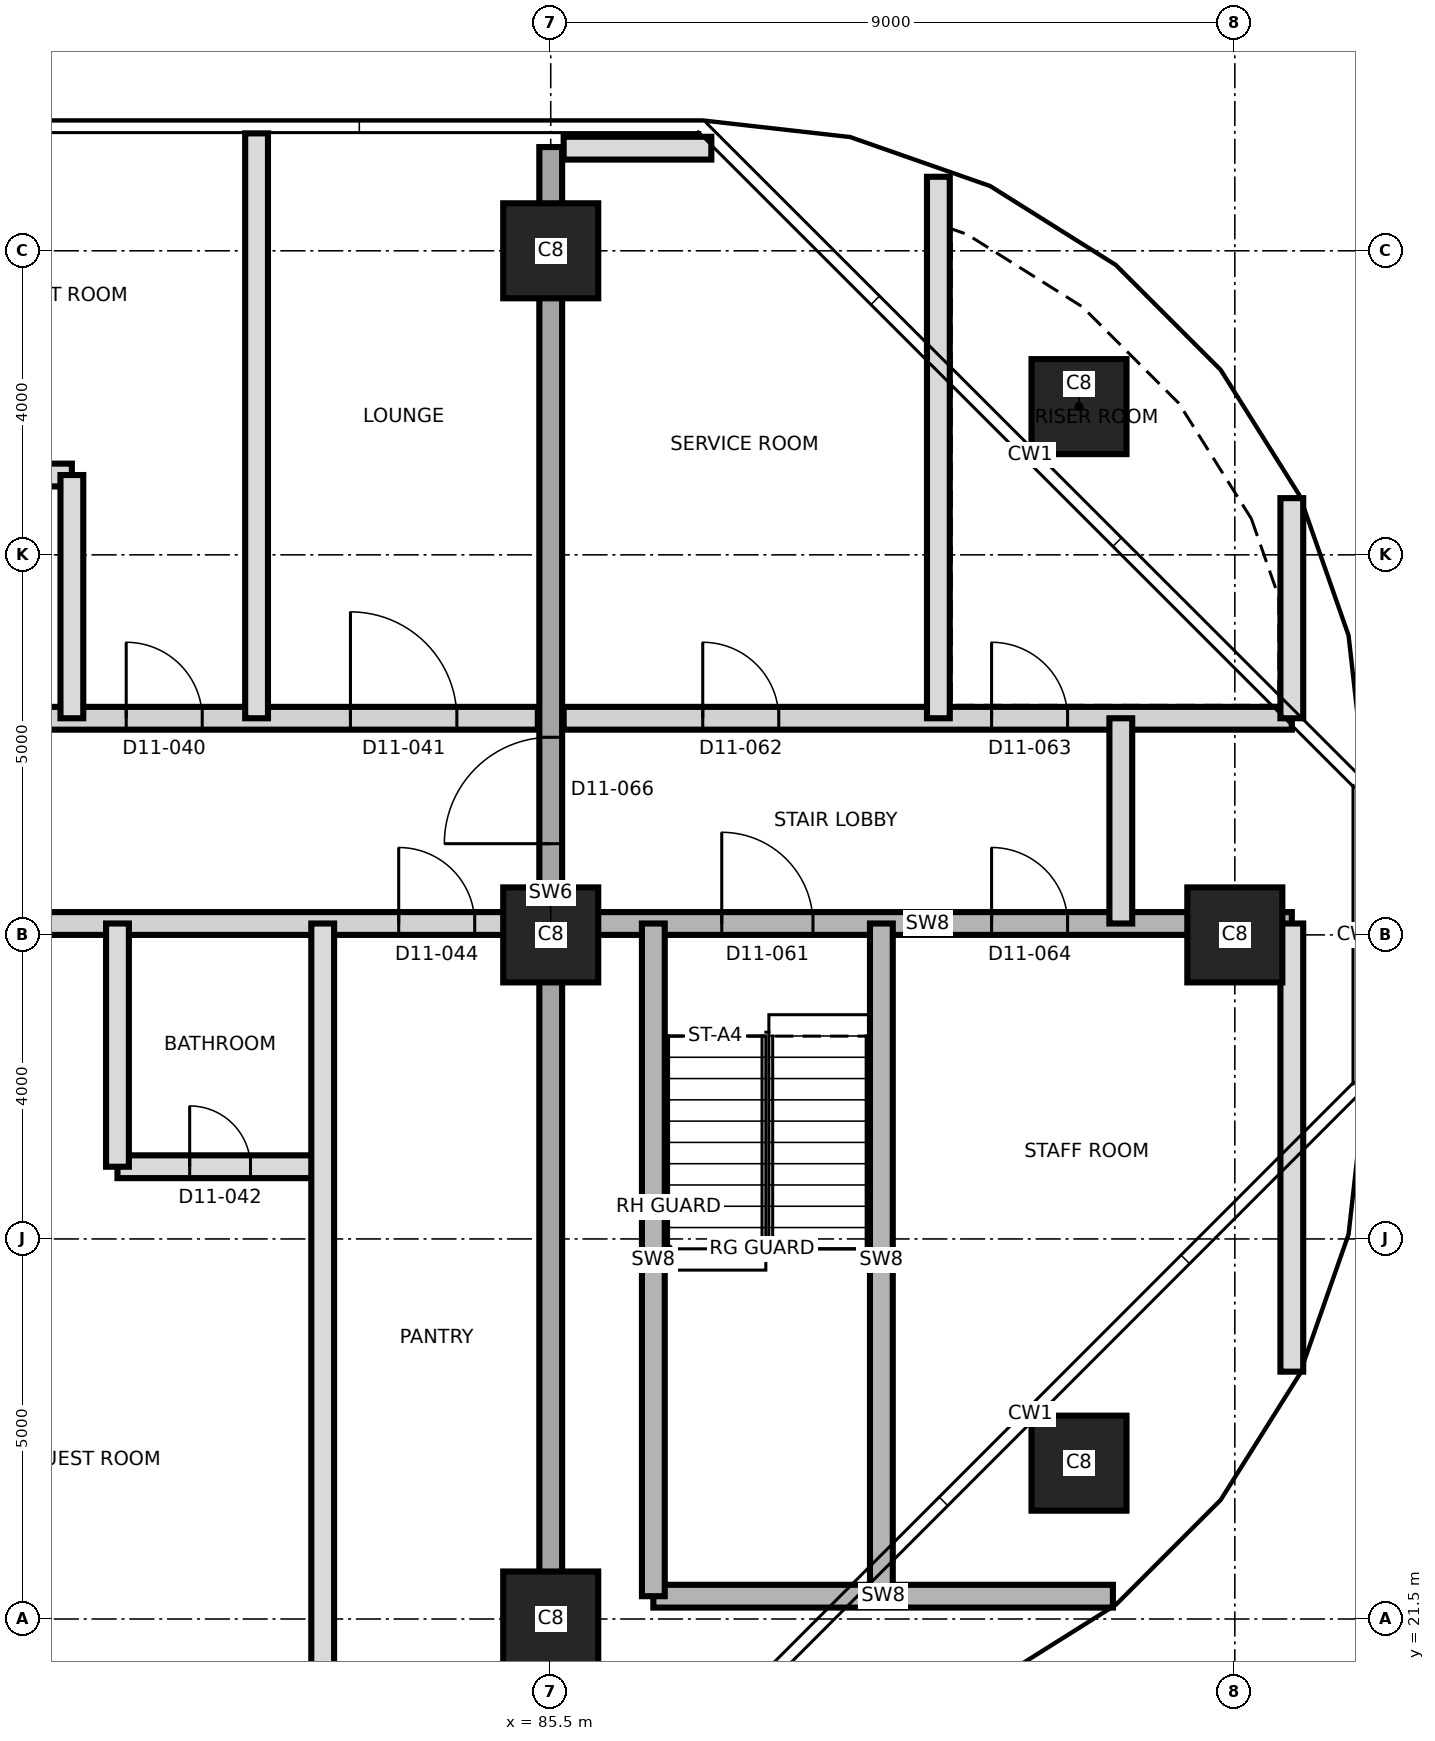
"""IFC4 building model, lengths in metres.
Left out: names, types, materials, properties, quantities, classifications, styles, units other than length and angle.
Written with IfcOpenShell. Run it as: python <this file> out.ifc"""

import sys

from ifc_helpers import new_model, si_unit, direction, frame, frame_2d, origin, origin_2d, place, context, subcontext, project, spatial, rectangle, extrude, element, fill, save


model = new_model("IFC4")
c1 = context("Model", 3, precision=1e-05, world=origin(), true_north=direction((0.0, 1.0)))
c2 = subcontext(c1, "Body", "Model", "MODEL_VIEW")
j1 = project(units=[si_unit("LENGTHUNIT", "METRE"), si_unit("PLANEANGLEUNIT", "RADIAN")], contexts=[c1])
p1 = place(None, origin())
s1 = spatial("IfcSite", under=j1, at=p1, CompositionType="ELEMENT")
p2 = place(p1, origin())
s2 = spatial("IfcBuilding", under=s1, at=p2, CompositionType="ELEMENT")
p3 = place(p2, frame((0.0, 0.0, 124.1)))
s3 = spatial("IfcBuildingStorey", under=s2, at=p3, CompositionType="ELEMENT", Elevation=124.1)
for number, where, z_axis, x_axis in (
    (1, (85.5, 21.5, 0.0), (0.0, 0.0, 1.0), (1.0, 0.0, 0.0)),
    (2, (92.45, 23.55, 0.0), (0.0, 0.0, 1.0), (1.0, 0.0, 0.0)),
    (3, (85.5, 30.5, 0.0), (0.0, 0.0, 1.0), (1.0, 0.0, 0.0)),
    (4, (94.5, 30.5, 0.0), (0.0, 0.0, 1.0), (1.0, 0.0, 0.0)),
    (5, (92.45, 37.45, 0.0), (0.0, 0.0, 1.0), (1.0, 0.0, 0.0)),
    (6, (85.5, 39.5, 0.0), (0.0, 0.0, 1.0), (1.0, 0.0, 0.0)),
):
    element("IfcColumn", number, at=place(p3, frame(where, z_axis=z_axis, x_axis=x_axis)), inside=s3, PredefinedType="COLUMN", context=c2, shape_type="SweptSolid", body=[
        extrude(rectangle(XDim=1.25, YDim=1.25, at=origin_2d()), origin(), (0.0, 0.0, 1.0), 3.7),
    ])
p4 = place(p3, frame((85.5, 20.135, 0.0), z_axis=(0.0, 0.0, 1.0), x_axis=(0.0, 1.0, 0.0)))
e7 = element("IfcWall", 7, at=p4, inside=s3, PredefinedType="SHEAR", context=c2, shape_type="SweptSolid", body=[
    extrude(rectangle(XDim=20.73, YDim=0.3, at=frame_2d((10.365, 0.0))), origin(), (0.0, 0.0, 1.0), 3.7),
])
p5 = place(p4, frame((11.565, 0.0, 0.0)))
e8 = element("IfcOpeningElement", 8, at=p5, cuts=e7, PredefinedType="OPENING", context=c2, shape_type="SweptSolid", body=[
    extrude(rectangle(XDim=1.4, YDim=2.1, at=frame_2d((0.7, 1.05))), frame((0.0, 0.16, 0.0), z_axis=(0.0, -1.0, 0.0), x_axis=(1.0, 0.0, 0.0)), (0.0, 0.0, 1.0), 0.32),
])
p6 = place(p3, frame((86.85, 21.8, 0.0), z_axis=(0.0, 0.0, 1.0), x_axis=(1.0, 0.0, 0.0)))
e9 = element("IfcWall", 9, at=p6, inside=s3, PredefinedType="SHEAR", context=c2, shape_type="SweptSolid", body=[
    extrude(rectangle(XDim=6.046, YDim=0.3, at=frame_2d((3.023, 0.0))), origin(), (0.0, 0.0, 1.0), 3.4),
])
p7 = place(p3, frame((79.8, 27.45, 0.0), z_axis=(0.0, 0.0, 1.0), x_axis=(1.0, 0.0, 0.0)))
e10 = element("IfcWall", 10, at=p7, inside=s3, PredefinedType="PARTITIONING", context=c2, shape_type="SweptSolid", body=[
    extrude(rectangle(XDim=2.7, YDim=0.3, at=frame_2d((1.35, 0.0))), origin(), (0.0, 0.0, 1.0), 3.4),
])
p8 = place(p7, frame((0.95, 0.0, 0.0)))
e11 = element("IfcOpeningElement", 11, at=p8, cuts=e10, PredefinedType="OPENING", context=c2, shape_type="SweptSolid", body=[
    extrude(rectangle(XDim=0.8, YDim=2.1, at=frame_2d((0.4, 1.05))), frame((0.0, 0.16, 0.0), z_axis=(0.0, -1.0, 0.0), x_axis=(1.0, 0.0, 0.0)), (0.0, 0.0, 1.0), 0.32),
])
p9 = place(p3, frame((58.8, 30.65, 0.0), z_axis=(0.0, 0.0, 1.0), x_axis=(1.0, 0.0, 0.0)))
e12 = element("IfcWall", 12, at=p9, inside=s3, PredefinedType="PARTITIONING", context=c2, shape_type="SweptSolid", body=[
    extrude(rectangle(XDim=26.53, YDim=0.3, at=frame_2d((13.265, 0.0))), origin(), (0.0, 0.0, 1.0), 3.4),
])
p10 = place(p9, frame((3.115, 0.0, 0.0)))
e13 = element("IfcOpeningElement", 13, at=p10, cuts=e12, PredefinedType="OPENING", context=c2, shape_type="SweptSolid", body=[
    extrude(rectangle(XDim=1.0, YDim=2.1, at=frame_2d((0.5, 1.05))), frame((0.0, 0.16, 0.0), z_axis=(0.0, -1.0, 0.0), x_axis=(1.0, 0.0, 0.0)), (0.0, 0.0, 1.0), 0.32),
])
p11 = place(p9, frame((6.065, 0.0, 0.0)))
e14 = element("IfcOpeningElement", 14, at=p11, cuts=e12, PredefinedType="OPENING", context=c2, shape_type="SweptSolid", body=[
    extrude(rectangle(XDim=1.4, YDim=2.1, at=frame_2d((0.7, 1.05))), frame((0.0, 0.16, 0.0), z_axis=(0.0, -1.0, 0.0), x_axis=(1.0, 0.0, 0.0)), (0.0, 0.0, 1.0), 0.32),
])
p12 = place(p9, frame((12.7, 0.0, 0.0)))
e15 = element("IfcOpeningElement", 15, at=p12, cuts=e12, PredefinedType="OPENING", context=c2, shape_type="SweptSolid", body=[
    extrude(rectangle(XDim=1.0, YDim=2.4, at=frame_2d((0.5, 1.2))), frame((0.0, 0.16, 0.0), z_axis=(0.0, -1.0, 0.0), x_axis=(1.0, 0.0, 0.0)), (0.0, 0.0, 1.0), 0.32),
])
p13 = place(p9, frame((18.85, 0.0, 0.0)))
e16 = element("IfcOpeningElement", 16, at=p13, cuts=e12, PredefinedType="OPENING", context=c2, shape_type="SweptSolid", body=[
    extrude(rectangle(XDim=1.0, YDim=2.1, at=frame_2d((0.5, 1.05))), frame((0.0, 0.16, 0.0), z_axis=(0.0, -1.0, 0.0), x_axis=(1.0, 0.0, 0.0)), (0.0, 0.0, 1.0), 0.32),
])
p14 = place(p9, frame((24.7, 0.0, 0.0)))
e17 = element("IfcOpeningElement", 17, at=p14, cuts=e12, PredefinedType="OPENING", context=c2, shape_type="SweptSolid", body=[
    extrude(rectangle(XDim=1.0, YDim=2.1, at=frame_2d((0.5, 1.05))), frame((0.0, 0.16, 0.0), z_axis=(0.0, -1.0, 0.0), x_axis=(1.0, 0.0, 0.0)), (0.0, 0.0, 1.0), 0.32),
])
p15 = place(p3, frame((85.67, 30.65, 0.0), z_axis=(0.0, 0.0, 1.0), x_axis=(1.0, 0.0, 0.0)))
e18 = element("IfcWall", 18, at=p15, inside=s3, PredefinedType="SHEAR", context=c2, shape_type="SweptSolid", body=[
    extrude(rectangle(XDim=9.58, YDim=0.3, at=frame_2d((4.79, 0.0))), origin(), (0.0, 0.0, 1.0), 3.4),
])
p16 = place(p15, frame((2.08, 0.0, 0.0)))
e19 = element("IfcOpeningElement", 19, at=p16, cuts=e18, PredefinedType="OPENING", context=c2, shape_type="SweptSolid", body=[
    extrude(rectangle(XDim=1.2, YDim=2.1, at=frame_2d((0.6, 1.05))), frame((0.0, 0.16, 0.0), z_axis=(0.0, -1.0, 0.0), x_axis=(1.0, 0.0, 0.0)), (0.0, 0.0, 1.0), 0.32),
])
p17 = place(p15, frame((5.63, 0.0, 0.0)))
e20 = element("IfcOpeningElement", 20, at=p17, cuts=e18, PredefinedType="OPENING", context=c2, shape_type="SweptSolid", body=[
    extrude(rectangle(XDim=1.0, YDim=2.1, at=frame_2d((0.5, 1.05))), frame((0.0, 0.16, 0.0), z_axis=(0.0, -1.0, 0.0), x_axis=(1.0, 0.0, 0.0)), (0.0, 0.0, 1.0), 0.32),
])
p18 = place(p3, frame((58.8, 33.35, 0.0), z_axis=(0.0, 0.0, 1.0), x_axis=(1.0, 0.0, 0.0)))
e21 = element("IfcWall", 21, at=p18, inside=s3, PredefinedType="PARTITIONING", context=c2, shape_type="SweptSolid", body=[
    extrude(rectangle(XDim=26.53, YDim=0.3, at=frame_2d((13.265, 0.0))), origin(), (0.0, 0.0, 1.0), 3.4),
])
p19 = place(p18, frame((0.835, 0.0, 0.0)))
e22 = element("IfcOpeningElement", 22, at=p19, cuts=e21, PredefinedType="OPENING", context=c2, shape_type="SweptSolid", body=[
    extrude(rectangle(XDim=1.2, YDim=2.1, at=frame_2d((0.6, 1.05))), frame((0.0, 0.16, 0.0), z_axis=(0.0, -1.0, 0.0), x_axis=(1.0, 0.0, 0.0)), (0.0, 0.0, 1.0), 0.32),
])
p20 = place(p18, frame((4.085, 0.0, 0.0)))
e23 = element("IfcOpeningElement", 23, at=p20, cuts=e21, PredefinedType="OPENING", context=c2, shape_type="SweptSolid", body=[
    extrude(rectangle(XDim=1.0, YDim=2.1, at=frame_2d((0.5, 1.05))), frame((0.0, 0.16, 0.0), z_axis=(0.0, -1.0, 0.0), x_axis=(1.0, 0.0, 0.0)), (0.0, 0.0, 1.0), 0.32),
])
p21 = place(p18, frame((12.7, 0.0, 0.0)))
e24 = element("IfcOpeningElement", 24, at=p21, cuts=e21, PredefinedType="OPENING", context=c2, shape_type="SweptSolid", body=[
    extrude(rectangle(XDim=1.0, YDim=2.4, at=frame_2d((0.5, 1.2))), frame((0.0, 0.16, 0.0), z_axis=(0.0, -1.0, 0.0), x_axis=(1.0, 0.0, 0.0)), (0.0, 0.0, 1.0), 0.32),
])
p22 = place(p18, frame((21.115, 0.0, 0.0)))
e25 = element("IfcOpeningElement", 25, at=p22, cuts=e21, PredefinedType="OPENING", context=c2, shape_type="SweptSolid", body=[
    extrude(rectangle(XDim=1.0, YDim=2.1, at=frame_2d((0.5, 1.05))), frame((0.0, 0.16, 0.0), z_axis=(0.0, -1.0, 0.0), x_axis=(1.0, 0.0, 0.0)), (0.0, 0.0, 1.0), 0.32),
])
p23 = place(p18, frame((24.065, 0.0, 0.0)))
e26 = element("IfcOpeningElement", 26, at=p23, cuts=e21, PredefinedType="OPENING", context=c2, shape_type="SweptSolid", body=[
    extrude(rectangle(XDim=1.4, YDim=2.1, at=frame_2d((0.7, 1.05))), frame((0.0, 0.16, 0.0), z_axis=(0.0, -1.0, 0.0), x_axis=(1.0, 0.0, 0.0)), (0.0, 0.0, 1.0), 0.32),
])
p24 = place(p3, frame((85.67, 33.35, 0.0), z_axis=(0.0, 0.0, 1.0), x_axis=(1.0, 0.0, 0.0)))
e27 = element("IfcWall", 27, at=p24, inside=s3, PredefinedType="PARTITIONING", context=c2, shape_type="SweptSolid", body=[
    extrude(rectangle(XDim=9.58, YDim=0.3, at=frame_2d((4.79, 0.0))), origin(), (0.0, 0.0, 1.0), 3.4),
])
p25 = place(p24, frame((1.83, 0.0, 0.0)))
e28 = element("IfcOpeningElement", 28, at=p25, cuts=e27, PredefinedType="OPENING", context=c2, shape_type="SweptSolid", body=[
    extrude(rectangle(XDim=1.0, YDim=2.1, at=frame_2d((0.5, 1.05))), frame((0.0, 0.16, 0.0), z_axis=(0.0, -1.0, 0.0), x_axis=(1.0, 0.0, 0.0)), (0.0, 0.0, 1.0), 0.32),
])
p26 = place(p24, frame((5.63, 0.0, 0.0)))
e29 = element("IfcOpeningElement", 29, at=p26, cuts=e27, PredefinedType="OPENING", context=c2, shape_type="SweptSolid", body=[
    extrude(rectangle(XDim=1.0, YDim=2.1, at=frame_2d((0.5, 1.05))), frame((0.0, 0.16, 0.0), z_axis=(0.0, -1.0, 0.0), x_axis=(1.0, 0.0, 0.0)), (0.0, 0.0, 1.0), 0.32),
])
p27 = place(p3, frame((76.5, 36.55, 0.0), z_axis=(0.0, 0.0, 1.0), x_axis=(1.0, 0.0, 0.0)))
e30 = element("IfcWall", 30, at=p27, inside=s3, PredefinedType="PARTITIONING", context=c2, shape_type="SweptSolid", body=[
    extrude(rectangle(XDim=2.7, YDim=0.3, at=frame_2d((1.35, 0.0))), origin(), (0.0, 0.0, 1.0), 3.4),
])
p28 = place(p27, frame((0.95, 0.0, 0.0)))
e31 = element("IfcOpeningElement", 31, at=p28, cuts=e30, PredefinedType="OPENING", context=c2, shape_type="SweptSolid", body=[
    extrude(rectangle(XDim=0.8, YDim=2.1, at=frame_2d((0.4, 1.05))), frame((0.0, 0.16, 0.0), z_axis=(0.0, -1.0, 0.0), x_axis=(1.0, 0.0, 0.0)), (0.0, 0.0, 1.0), 0.32),
])
p29 = place(p3, frame((85.67, 40.85, 0.0), z_axis=(0.0, 0.0, 1.0), x_axis=(1.0, 0.0, 0.0)))
e32 = element("IfcWall", 32, at=p29, inside=s3, PredefinedType="PARTITIONING", context=c2, shape_type="SweptSolid", body=[
    extrude(rectangle(XDim=1.943, YDim=0.3, at=frame_2d((0.972, 0.0))), origin(), (0.0, 0.0, 1.0), 3.4),
])
for number, where, z_axis, x_axis in (
    (33, (79.2, 33.35, 0.0), (0.0, 0.0, 1.0), (0.0, 1.0, 0.0)),
    (34, (79.8, 27.45, 0.0), (0.0, 0.0, 1.0), (0.0, 1.0, 0.0)),
):
    element("IfcWall", number, at=place(p3, frame(where, z_axis=z_axis, x_axis=x_axis)), inside=s3, PredefinedType="PARTITIONING", context=c2, shape_type="SweptSolid", body=[
        extrude(rectangle(XDim=3.2, YDim=0.3, at=frame_2d((1.6, 0.0))), origin(), (0.0, 0.0, 1.0), 3.4),
    ])
p30 = place(p3, frame((81.63, 33.35, 0.0), z_axis=(0.0, 0.0, 1.0), x_axis=(0.0, 1.0, 0.0)))
e35 = element("IfcWall", 35, at=p30, inside=s3, PredefinedType="PARTITIONING", context=c2, shape_type="SweptSolid", body=[
    extrude(rectangle(XDim=7.695, YDim=0.3, at=frame_2d((3.847, 0.0))), origin(), (0.0, 0.0, 1.0), 3.4),
])
p31 = place(p3, frame((82.5, 20.135, 0.0), z_axis=(0.0, 0.0, 1.0), x_axis=(0.0, 1.0, 0.0)))
e36 = element("IfcWall", 36, at=p31, inside=s3, PredefinedType="PARTITIONING", context=c2, shape_type="SweptSolid", body=[
    extrude(rectangle(XDim=10.515, YDim=0.3, at=frame_2d((5.257, 0.0))), origin(), (0.0, 0.0, 1.0), 3.4),
])
for number, where, z_axis, x_axis in (
    (37, (86.85, 21.8, 0.0), (0.0, 0.0, 1.0), (0.0, 1.0, 0.0)),
    (38, (89.85, 21.8, 0.0), (0.0, 0.0, 1.0), (0.0, 1.0, 0.0)),
):
    element("IfcWall", number, at=place(p3, frame(where, z_axis=z_axis, x_axis=x_axis)), inside=s3, PredefinedType="SHEAR", context=c2, shape_type="SweptSolid", body=[
        extrude(rectangle(XDim=8.85, YDim=0.3, at=frame_2d((4.425, 0.0))), origin(), (0.0, 0.0, 1.0), 3.4),
    ])
p32 = place(p3, frame((90.6, 33.35, 0.0), z_axis=(0.0, 0.0, 1.0), x_axis=(0.0, 1.0, 0.0)))
e39 = element("IfcWall", 39, at=p32, inside=s3, PredefinedType="PARTITIONING", context=c2, shape_type="SweptSolid", body=[
    extrude(rectangle(XDim=7.124, YDim=0.3, at=frame_2d((3.562, 0.0))), origin(), (0.0, 0.0, 1.0), 3.4),
])
p33 = place(p3, frame((93.0, 30.65, 0.0), z_axis=(0.0, 0.0, 1.0), x_axis=(0.0, 1.0, 0.0)))
e40 = element("IfcWall", 40, at=p33, inside=s3, PredefinedType="PARTITIONING", context=c2, shape_type="SweptSolid", body=[
    extrude(rectangle(XDim=2.7, YDim=0.3, at=frame_2d((1.35, 0.0))), origin(), (0.0, 0.0, 1.0), 3.4),
])
p34 = place(p3, frame((95.25, 24.754, 0.0), z_axis=(0.0, 0.0, 1.0), x_axis=(0.0, 1.0, 0.0)))
e41 = element("IfcWall", 41, at=p34, inside=s3, PredefinedType="PARTITIONING", context=c2, shape_type="SweptSolid", body=[
    extrude(rectangle(XDim=5.896, YDim=0.3, at=frame_2d((2.948, 0.0))), origin(), (0.0, 0.0, 1.0), 3.4),
])
p35 = place(p3, frame((95.25, 33.35, 0.0), z_axis=(0.0, 0.0, 1.0), x_axis=(0.0, 1.0, 0.0)))
e42 = element("IfcWall", 42, at=p35, inside=s3, PredefinedType="PARTITIONING", context=c2, shape_type="SweptSolid", body=[
    extrude(rectangle(XDim=2.896, YDim=0.3, at=frame_2d((1.448, 0.0))), origin(), (0.0, 0.0, 1.0), 3.4),
])
p36 = place(p22, origin())
e43 = element("IfcDoor", 43, at=p36, inside=s3, OperationType="SINGLE_SWING_LEFT", PredefinedType="DOOR", context=c2, shape_type="SweptSolid", body=[
    extrude(rectangle(XDim=1.0, YDim=2.1, at=frame_2d((0.5, 1.05))), frame((0.0, 0.025, 0.0), z_axis=(0.0, -1.0, 0.0), x_axis=(1.0, 0.0, 0.0)), (0.0, 0.0, 1.0), 0.05),
])
fill(e25, e43)
p37 = place(p23, origin())
e44 = element("IfcDoor", 44, at=p37, inside=s3, OperationType="SINGLE_SWING_RIGHT", PredefinedType="DOOR", context=c2, shape_type="SweptSolid", body=[
    extrude(rectangle(XDim=1.4, YDim=2.1, at=frame_2d((0.7, 1.05))), frame((0.0, 0.025, 0.0), z_axis=(0.0, -1.0, 0.0), x_axis=(1.0, 0.0, 0.0)), (0.0, 0.0, 1.0), 0.05),
])
fill(e26, e44)
p38 = place(p8, origin())
e45 = element("IfcDoor", 45, at=p38, inside=s3, OperationType="SINGLE_SWING_LEFT", PredefinedType="DOOR", context=c2, shape_type="SweptSolid", body=[
    extrude(rectangle(XDim=0.8, YDim=2.1, at=frame_2d((0.4, 1.05))), frame((0.0, 0.025, 0.0), z_axis=(0.0, -1.0, 0.0), x_axis=(1.0, 0.0, 0.0)), (0.0, 0.0, 1.0), 0.05),
])
fill(e11, e45)
p39 = place(p14, origin())
e46 = element("IfcDoor", 46, at=p39, inside=s3, OperationType="SINGLE_SWING_RIGHT", PredefinedType="DOOR", context=c2, shape_type="SweptSolid", body=[
    extrude(rectangle(XDim=1.0, YDim=2.1, at=frame_2d((0.5, 1.05))), frame((0.0, 0.025, 0.0), z_axis=(0.0, -1.0, 0.0), x_axis=(1.0, 0.0, 0.0)), (0.0, 0.0, 1.0), 0.05),
])
fill(e17, e46)
p40 = place(p16, origin())
e47 = element("IfcDoor", 47, at=p40, inside=s3, OperationType="SINGLE_SWING_LEFT", PredefinedType="DOOR", context=c2, shape_type="SweptSolid", body=[
    extrude(rectangle(XDim=1.2, YDim=2.1, at=frame_2d((0.6, 1.05))), frame((0.0, 0.025, 0.0), z_axis=(0.0, -1.0, 0.0), x_axis=(1.0, 0.0, 0.0)), (0.0, 0.0, 1.0), 0.05),
])
fill(e19, e47)
p41 = place(p25, origin())
e48 = element("IfcDoor", 48, at=p41, inside=s3, OperationType="SINGLE_SWING_LEFT", PredefinedType="DOOR", context=c2, shape_type="SweptSolid", body=[
    extrude(rectangle(XDim=1.0, YDim=2.1, at=frame_2d((0.5, 1.05))), frame((0.0, 0.025, 0.0), z_axis=(0.0, -1.0, 0.0), x_axis=(1.0, 0.0, 0.0)), (0.0, 0.0, 1.0), 0.05),
])
fill(e28, e48)
p42 = place(p26, origin())
e49 = element("IfcDoor", 49, at=p42, inside=s3, OperationType="SINGLE_SWING_RIGHT", PredefinedType="DOOR", context=c2, shape_type="SweptSolid", body=[
    extrude(rectangle(XDim=1.0, YDim=2.1, at=frame_2d((0.5, 1.05))), frame((0.0, 0.025, 0.0), z_axis=(0.0, -1.0, 0.0), x_axis=(1.0, 0.0, 0.0)), (0.0, 0.0, 1.0), 0.05),
])
fill(e29, e49)
p43 = place(p17, origin())
e50 = element("IfcDoor", 50, at=p43, inside=s3, OperationType="SINGLE_SWING_LEFT", PredefinedType="DOOR", context=c2, shape_type="SweptSolid", body=[
    extrude(rectangle(XDim=1.0, YDim=2.1, at=frame_2d((0.5, 1.05))), frame((0.0, 0.025, 0.0), z_axis=(0.0, -1.0, 0.0), x_axis=(1.0, 0.0, 0.0)), (0.0, 0.0, 1.0), 0.05),
])
fill(e20, e50)
p44 = place(p5, origin())
e51 = element("IfcDoor", 51, at=p44, inside=s3, OperationType="SINGLE_SWING_RIGHT", PredefinedType="DOOR", context=c2, shape_type="SweptSolid", body=[
    extrude(rectangle(XDim=1.4, YDim=2.1, at=frame_2d((0.7, 1.05))), frame((0.0, 0.025, 0.0), z_axis=(0.0, -1.0, 0.0), x_axis=(1.0, 0.0, 0.0)), (0.0, 0.0, 1.0), 0.05),
])
fill(e8, e51)
save(model, sys.argv[1])
